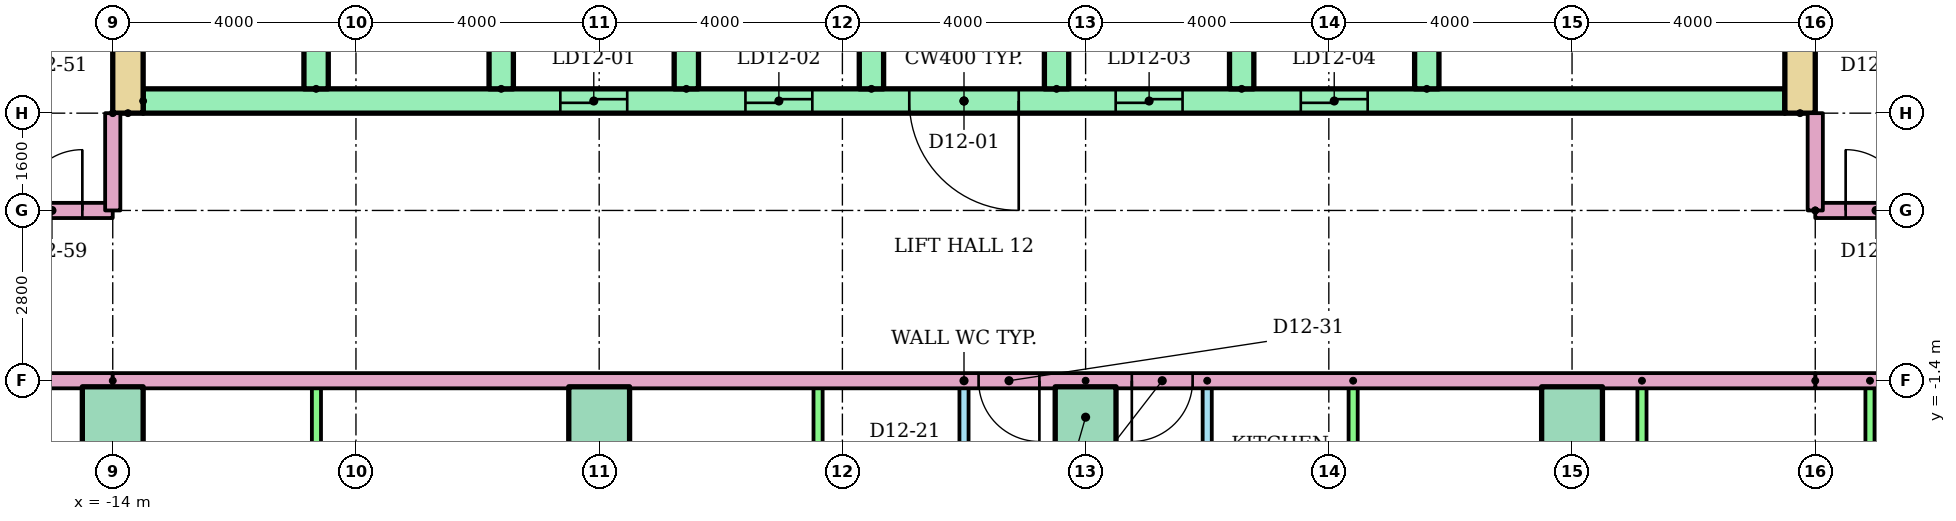
"""IFC4 building model, lengths in metres.
Left out: names, types, materials, properties, quantities, classifications, styles, units other than length and angle.
Written with IfcOpenShell. Run it as: python <this file> out.ifc"""

import sys

from ifc_helpers import new_model, si_unit, direction, frame, frame_2d, origin, origin_2d, place, context, subcontext, project, spatial, rectangle, extrude, element, fill, save


model = new_model("IFC4")
c1 = context("Model", 3, precision=1e-05, world=origin(), true_north=direction((0.0, 1.0)))
c2 = subcontext(c1, "Body", "Model", "MODEL_VIEW")
j1 = project(units=[si_unit("LENGTHUNIT", "METRE"), si_unit("PLANEANGLEUNIT", "RADIAN")], contexts=[c1])
p1 = place(None, origin())
s1 = spatial("IfcSite", under=j1, at=p1, CompositionType="ELEMENT")
p2 = place(p1, origin())
s2 = spatial("IfcBuilding", under=s1, at=p2, CompositionType="ELEMENT")
p3 = place(p2, frame((0.0, 0.0, 48.0)))
s3 = spatial("IfcBuildingStorey", under=s2, at=p3, CompositionType="ELEMENT", Elevation=48.0)
for number, where in (
    (1, (-14.0, -2.0, 0.0)),
    (2, (-6.0, -2.0, 0.0)),
    (3, (2.0, -2.0, 0.0)),
    (4, (10.0, -2.0, 0.0)),
):
    element("IfcColumn", number, at=place(p3, frame(where)), inside=s3, PredefinedType="COLUMN", context=c2, shape_type="SweptSolid", body=[
        extrude(rectangle(XDim=1.0, YDim=1.0, at=origin_2d()), origin(), (0.0, 0.0, 1.0), 3.2),
    ])
for number, where, z_axis, x_axis in (
    (5, (-13.75, 3.0, 0.0), (0.0, 0.0, 1.0), (0.0, 1.0, 0.0)),
    (6, (13.75, 3.0, 0.0), (0.0, 0.0, 1.0), (0.0, 1.0, 0.0)),
):
    element("IfcWall", number, at=place(p3, frame(where, z_axis=z_axis, x_axis=x_axis)), inside=s3, PredefinedType="SHEAR", context=c2, shape_type="SweptSolid", body=[
        extrude(rectangle(XDim=17.0, YDim=0.5, at=frame_2d((8.5, 0.0))), origin(), (0.0, 0.0, 1.0), 2.92),
    ])
p4 = place(p3, frame((-13.5, 3.2, 0.0)))
e7 = element("IfcWall", 7, at=p4, inside=s3, PredefinedType="SHEAR", context=c2, shape_type="SweptSolid", body=[
    extrude(rectangle(XDim=27.0, YDim=0.4, at=frame_2d((13.5, 0.0))), origin(), (0.0, 0.0, 1.0), 2.92),
])
p5 = place(p4, frame((6.861, 0.0, 0.0)))
e8 = element("IfcOpeningElement", 8, at=p5, cuts=e7, PredefinedType="OPENING", context=c2, shape_type="SweptSolid", body=[
    extrude(rectangle(XDim=1.1, YDim=2.1, at=frame_2d((0.55, 1.05))), frame((0.0, 0.21, 0.0), z_axis=(0.0, -1.0, 0.0), x_axis=(1.0, 0.0, 0.0)), (0.0, 0.0, 1.0), 0.42),
])
p6 = place(p4, frame((9.906, 0.0, 0.0)))
e9 = element("IfcOpeningElement", 9, at=p6, cuts=e7, PredefinedType="OPENING", context=c2, shape_type="SweptSolid", body=[
    extrude(rectangle(XDim=1.1, YDim=2.1, at=frame_2d((0.55, 1.05))), frame((0.0, 0.21, 0.0), z_axis=(0.0, -1.0, 0.0), x_axis=(1.0, 0.0, 0.0)), (0.0, 0.0, 1.0), 0.42),
])
p7 = place(p4, frame((15.994, 0.0, 0.0)))
e10 = element("IfcOpeningElement", 10, at=p7, cuts=e7, PredefinedType="OPENING", context=c2, shape_type="SweptSolid", body=[
    extrude(rectangle(XDim=1.1, YDim=2.1, at=frame_2d((0.55, 1.05))), frame((0.0, 0.21, 0.0), z_axis=(0.0, -1.0, 0.0), x_axis=(1.0, 0.0, 0.0)), (0.0, 0.0, 1.0), 0.42),
])
p8 = place(p4, frame((19.039, 0.0, 0.0)))
e11 = element("IfcOpeningElement", 11, at=p8, cuts=e7, PredefinedType="OPENING", context=c2, shape_type="SweptSolid", body=[
    extrude(rectangle(XDim=1.1, YDim=2.1, at=frame_2d((0.55, 1.05))), frame((0.0, 0.21, 0.0), z_axis=(0.0, -1.0, 0.0), x_axis=(1.0, 0.0, 0.0)), (0.0, 0.0, 1.0), 0.42),
])
p9 = place(p4, frame((12.6, 0.0, 0.0)))
e12 = element("IfcOpeningElement", 12, at=p9, cuts=e7, PredefinedType="OPENING", context=c2, shape_type="SweptSolid", body=[
    extrude(rectangle(XDim=1.8, YDim=2.1, at=frame_2d((0.9, 1.05))), frame((0.0, 0.21, 0.0), z_axis=(0.0, -1.0, 0.0), x_axis=(1.0, 0.0, 0.0)), (0.0, 0.0, 1.0), 0.42),
])
for number, where, z_axis, x_axis in (
    (13, (-10.656, 3.4, 0.0), (0.0, 0.0, 1.0), (0.0, 1.0, 0.0)),
    (14, (-7.611, 3.4, 0.0), (0.0, 0.0, 1.0), (0.0, 1.0, 0.0)),
    (15, (-4.567, 3.4, 0.0), (0.0, 0.0, 1.0), (0.0, 1.0, 0.0)),
    (16, (-1.522, 3.4, 0.0), (0.0, 0.0, 1.0), (0.0, 1.0, 0.0)),
    (17, (1.522, 3.4, 0.0), (0.0, 0.0, 1.0), (0.0, 1.0, 0.0)),
    (18, (4.567, 3.4, 0.0), (0.0, 0.0, 1.0), (0.0, 1.0, 0.0)),
    (19, (7.611, 3.4, 0.0), (0.0, 0.0, 1.0), (0.0, 1.0, 0.0)),
):
    element("IfcWall", number, at=place(p3, frame(where, z_axis=z_axis, x_axis=x_axis)), inside=s3, PredefinedType="SHEAR", context=c2, shape_type="SweptSolid", body=[
        extrude(rectangle(XDim=3.0, YDim=0.4, at=frame_2d((1.5, 0.0))), origin(), (0.0, 0.0, 1.0), 2.92),
    ])
p10 = place(p3, frame((0.0, -7.8, 0.0), z_axis=(0.0, 0.0, 1.0), x_axis=(0.0, 1.0, 0.0)))
e20 = element("IfcWall", 20, at=p10, inside=s3, PredefinedType="PARTITIONING", context=c2, shape_type="SweptSolid", body=[
    extrude(rectangle(XDim=6.4, YDim=0.15, at=frame_2d((3.2, 0.0))), origin(), (0.0, 0.0, 1.0), 2.4),
])
p11 = place(p10, frame((4.14, 0.0, 0.0)))
e21 = element("IfcOpeningElement", 21, at=p11, cuts=e20, PredefinedType="OPENING", context=c2, shape_type="SweptSolid", body=[
    extrude(rectangle(XDim=0.9, YDim=2.1, at=frame_2d((0.45, 1.05))), frame((0.0, 0.085, 0.0), z_axis=(0.0, -1.0, 0.0), x_axis=(1.0, 0.0, 0.0)), (0.0, 0.0, 1.0), 0.17),
])
p12 = place(p10, frame((1.05, 0.0, 0.0)))
e22 = element("IfcOpeningElement", 22, at=p12, cuts=e20, PredefinedType="OPENING", context=c2, shape_type="SweptSolid", body=[
    extrude(rectangle(XDim=0.8, YDim=2.1, at=frame_2d((0.4, 1.05))), frame((0.0, 0.085, 0.0), z_axis=(0.0, -1.0, 0.0), x_axis=(1.0, 0.0, 0.0)), (0.0, 0.0, 1.0), 0.17),
])
for number, where, z_axis, x_axis in (
    (23, (-2.4, -7.8, 0.0), (0.0, 0.0, 1.0), (0.0, 1.0, 0.0)),
    (24, (-10.65, -7.8, 0.0), (0.0, 0.0, 1.0), (0.0, 1.0, 0.0)),
):
    element("IfcWall", number, at=place(p3, frame(where, z_axis=z_axis, x_axis=x_axis)), inside=s3, PredefinedType="PARTITIONING", context=c2, shape_type="SweptSolid", body=[
        extrude(rectangle(XDim=6.4, YDim=0.15, at=frame_2d((3.2, 0.0))), origin(), (0.0, 0.0, 1.0), 2.4),
    ])
p13 = place(p3, frame((4.0, -1.4, 0.0), z_axis=(0.0, 0.0, 1.0), x_axis=(0.0, -1.0, 0.0)))
e25 = element("IfcWall", 25, at=p13, inside=s3, PredefinedType="PARTITIONING", context=c2, shape_type="SweptSolid", body=[
    extrude(rectangle(XDim=6.4, YDim=0.15, at=frame_2d((3.2, 0.0))), origin(), (0.0, 0.0, 1.0), 2.4),
])
p14 = place(p13, frame((1.36, 0.0, 0.0)))
e26 = element("IfcOpeningElement", 26, at=p14, cuts=e25, PredefinedType="OPENING", context=c2, shape_type="SweptSolid", body=[
    extrude(rectangle(XDim=0.9, YDim=2.1, at=frame_2d((0.45, 1.05))), frame((0.0, 0.085, 0.0), z_axis=(0.0, -1.0, 0.0), x_axis=(1.0, 0.0, 0.0)), (0.0, 0.0, 1.0), 0.17),
])
p15 = place(p13, frame((4.55, 0.0, 0.0)))
e27 = element("IfcOpeningElement", 27, at=p15, cuts=e25, PredefinedType="OPENING", context=c2, shape_type="SweptSolid", body=[
    extrude(rectangle(XDim=0.8, YDim=2.1, at=frame_2d((0.4, 1.05))), frame((0.0, 0.085, 0.0), z_axis=(0.0, -1.0, 0.0), x_axis=(1.0, 0.0, 0.0)), (0.0, 0.0, 1.0), 0.17),
])
for number, where, z_axis, x_axis in (
    (28, (6.4, -1.4, 0.0), (0.0, 0.0, 1.0), (0.0, -1.0, 0.0)),
    (29, (11.15, -1.4, 0.0), (0.0, 0.0, 1.0), (0.0, -1.0, 0.0)),
    (30, (14.9, -1.4, 0.0), (0.0, 0.0, 1.0), (0.0, -1.0, 0.0)),
):
    element("IfcWall", number, at=place(p3, frame(where, z_axis=z_axis, x_axis=x_axis)), inside=s3, PredefinedType="PARTITIONING", context=c2, shape_type="SweptSolid", body=[
        extrude(rectangle(XDim=6.4, YDim=0.15, at=frame_2d((3.2, 0.0))), origin(), (0.0, 0.0, 1.0), 2.4),
    ])
p16 = place(p3, frame((2.0, -1.4, 0.0), z_axis=(0.0, 0.0, 1.0), x_axis=(0.0, -1.0, 0.0)))
e31 = element("IfcWall", 31, at=p16, inside=s3, PredefinedType="PARTITIONING", context=c2, shape_type="SweptSolid", body=[
    extrude(rectangle(XDim=14.71, YDim=0.25, at=frame_2d((7.355, 0.0))), origin(), (0.0, 0.0, 1.0), 2.4),
])
p17 = place(p3, frame((-14.0, -1.4, 0.0), z_axis=(0.0, 0.0, 1.0), x_axis=(-1.0, 0.0, 0.0)))
e32 = element("IfcWall", 32, at=p17, inside=s3, PredefinedType="PARTITIONING", context=c2, shape_type="SweptSolid", body=[
    extrude(rectangle(XDim=15.0, YDim=0.25, at=frame_2d((7.5, 0.0))), origin(), (0.0, 0.0, 1.0), 2.4),
])
p18 = place(p17, frame((8.76, 0.0, 0.0)))
e33 = element("IfcOpeningElement", 33, at=p18, cuts=e32, PredefinedType="OPENING", context=c2, shape_type="SweptSolid", body=[
    extrude(rectangle(XDim=1.0, YDim=2.1, at=frame_2d((0.5, 1.05))), frame((0.0, 0.135, 0.0), z_axis=(0.0, -1.0, 0.0), x_axis=(1.0, 0.0, 0.0)), (0.0, 0.0, 1.0), 0.27),
])
p19 = place(p3, frame((29.0, -1.4, 0.0), z_axis=(0.0, 0.0, 1.0), x_axis=(-1.0, 0.0, 0.0)))
e34 = element("IfcWall", 34, at=p19, inside=s3, PredefinedType="PARTITIONING", context=c2, shape_type="SweptSolid", body=[
    extrude(rectangle(XDim=15.0, YDim=0.25, at=frame_2d((7.5, 0.0))), origin(), (0.0, 0.0, 1.0), 2.4),
])
p20 = place(p19, frame((9.24, 0.0, 0.0)))
e35 = element("IfcOpeningElement", 35, at=p20, cuts=e34, PredefinedType="OPENING", context=c2, shape_type="SweptSolid", body=[
    extrude(rectangle(XDim=1.0, YDim=2.1, at=frame_2d((0.5, 1.05))), frame((0.0, 0.135, 0.0), z_axis=(0.0, -1.0, 0.0), x_axis=(1.0, 0.0, 0.0)), (0.0, 0.0, 1.0), 0.27),
])
p21 = place(p3, frame((-29.0, 1.4, 0.0)))
e36 = element("IfcWall", 36, at=p21, inside=s3, PredefinedType="PARTITIONING", context=c2, shape_type="SweptSolid", body=[
    extrude(rectangle(XDim=15.0, YDim=0.25, at=frame_2d((7.5, 0.0))), origin(), (0.0, 0.0, 1.0), 2.4),
])
p22 = place(p21, frame((13.5, 0.0, 0.0)))
e37 = element("IfcOpeningElement", 37, at=p22, cuts=e36, PredefinedType="OPENING", context=c2, shape_type="SweptSolid", body=[
    extrude(rectangle(XDim=1.0, YDim=2.1, at=frame_2d((0.5, 1.05))), frame((0.0, 0.135, 0.0), z_axis=(0.0, -1.0, 0.0), x_axis=(1.0, 0.0, 0.0)), (0.0, 0.0, 1.0), 0.27),
])
p23 = place(p3, frame((14.0, 1.4, 0.0)))
e38 = element("IfcWall", 38, at=p23, inside=s3, PredefinedType="PARTITIONING", context=c2, shape_type="SweptSolid", body=[
    extrude(rectangle(XDim=15.0, YDim=0.25, at=frame_2d((7.5, 0.0))), origin(), (0.0, 0.0, 1.0), 2.4),
])
p24 = place(p23, frame((0.5, 0.0, 0.0)))
e39 = element("IfcOpeningElement", 39, at=p24, cuts=e38, PredefinedType="OPENING", context=c2, shape_type="SweptSolid", body=[
    extrude(rectangle(XDim=1.0, YDim=2.1, at=frame_2d((0.5, 1.05))), frame((0.0, 0.135, 0.0), z_axis=(0.0, -1.0, 0.0), x_axis=(1.0, 0.0, 0.0)), (0.0, 0.0, 1.0), 0.27),
])
p25 = place(p23, frame((12.76, 0.0, 0.0)))
e40 = element("IfcOpeningElement", 40, at=p25, cuts=e38, PredefinedType="OPENING", context=c2, shape_type="SweptSolid", body=[
    extrude(rectangle(XDim=1.0, YDim=2.1, at=frame_2d((0.5, 1.05))), frame((0.0, 0.135, 0.0), z_axis=(0.0, -1.0, 0.0), x_axis=(1.0, 0.0, 0.0)), (0.0, 0.0, 1.0), 0.27),
])
p26 = place(p3, frame((14.0, -1.4, 0.0), z_axis=(0.0, 0.0, 1.0), x_axis=(-1.0, 0.0, 0.0)))
e41 = element("IfcWall", 41, at=p26, inside=s3, PredefinedType="PARTITIONING", context=c2, shape_type="SweptSolid", body=[
    extrude(rectangle(XDim=28.0, YDim=0.25, at=frame_2d((14.0, 0.0))), origin(), (0.0, 0.0, 1.0), 2.4),
])
p27 = place(p26, frame((12.76, 0.0, 0.0)))
e42 = element("IfcOpeningElement", 42, at=p27, cuts=e41, PredefinedType="OPENING", context=c2, shape_type="SweptSolid", body=[
    extrude(rectangle(XDim=1.0, YDim=2.1, at=frame_2d((0.5, 1.05))), frame((0.0, 0.135, 0.0), z_axis=(0.0, -1.0, 0.0), x_axis=(1.0, 0.0, 0.0)), (0.0, 0.0, 1.0), 0.27),
])
p28 = place(p26, frame((10.24, 0.0, 0.0)))
e43 = element("IfcOpeningElement", 43, at=p28, cuts=e41, PredefinedType="OPENING", context=c2, shape_type="SweptSolid", body=[
    extrude(rectangle(XDim=1.0, YDim=2.1, at=frame_2d((0.5, 1.05))), frame((0.0, 0.135, 0.0), z_axis=(0.0, -1.0, 0.0), x_axis=(1.0, 0.0, 0.0)), (0.0, 0.0, 1.0), 0.27),
])
for number, where, z_axis, x_axis in (
    (44, (-14.0, 3.0, 0.0), (0.0, 0.0, 1.0), (0.0, -1.0, 0.0)),
    (45, (14.0, 1.4, 0.0), (0.0, 0.0, 1.0), (0.0, 1.0, 0.0)),
):
    element("IfcWall", number, at=place(p3, frame(where, z_axis=z_axis, x_axis=x_axis)), inside=s3, PredefinedType="PARTITIONING", context=c2, shape_type="SweptSolid", body=[
        extrude(rectangle(XDim=1.6, YDim=0.25, at=frame_2d((0.8, 0.0))), origin(), (0.0, 0.0, 1.0), 2.4),
    ])
p29 = place(p5, origin())
e46 = element("IfcDoor", 46, at=p29, inside=s3, OperationType="SLIDING_TO_LEFT", PredefinedType="DOOR", context=c2, shape_type="SweptSolid", body=[
    extrude(rectangle(XDim=1.1, YDim=2.1, at=frame_2d((0.55, 1.05))), frame((0.0, 0.025, 0.0), z_axis=(0.0, -1.0, 0.0), x_axis=(1.0, 0.0, 0.0)), (0.0, 0.0, 1.0), 0.05),
])
fill(e8, e46)
p30 = place(p6, origin())
e47 = element("IfcDoor", 47, at=p30, inside=s3, OperationType="SLIDING_TO_LEFT", PredefinedType="DOOR", context=c2, shape_type="SweptSolid", body=[
    extrude(rectangle(XDim=1.1, YDim=2.1, at=frame_2d((0.55, 1.05))), frame((0.0, 0.025, 0.0), z_axis=(0.0, -1.0, 0.0), x_axis=(1.0, 0.0, 0.0)), (0.0, 0.0, 1.0), 0.05),
])
fill(e9, e47)
p31 = place(p7, origin())
e48 = element("IfcDoor", 48, at=p31, inside=s3, OperationType="SLIDING_TO_LEFT", PredefinedType="DOOR", context=c2, shape_type="SweptSolid", body=[
    extrude(rectangle(XDim=1.1, YDim=2.1, at=frame_2d((0.55, 1.05))), frame((0.0, 0.025, 0.0), z_axis=(0.0, -1.0, 0.0), x_axis=(1.0, 0.0, 0.0)), (0.0, 0.0, 1.0), 0.05),
])
fill(e10, e48)
p32 = place(p8, origin())
e49 = element("IfcDoor", 49, at=p32, inside=s3, OperationType="SLIDING_TO_LEFT", PredefinedType="DOOR", context=c2, shape_type="SweptSolid", body=[
    extrude(rectangle(XDim=1.1, YDim=2.1, at=frame_2d((0.55, 1.05))), frame((0.0, 0.025, 0.0), z_axis=(0.0, -1.0, 0.0), x_axis=(1.0, 0.0, 0.0)), (0.0, 0.0, 1.0), 0.05),
])
fill(e11, e49)
p33 = place(p9, frame((1.8, 0.0, 0.0), z_axis=(0.0, 0.0, 1.0), x_axis=(-1.0, 0.0, 0.0)))
e50 = element("IfcDoor", 50, at=p33, inside=s3, OperationType="DOUBLE_DOOR_SINGLE_SWING", PredefinedType="DOOR", context=c2, shape_type="SweptSolid", body=[
    extrude(rectangle(XDim=1.8, YDim=2.1, at=frame_2d((0.9, 1.05))), frame((0.0, 0.025, 0.0), z_axis=(0.0, -1.0, 0.0), x_axis=(1.0, 0.0, 0.0)), (0.0, 0.0, 1.0), 0.05),
])
fill(e12, e50)
p34 = place(p27, origin())
e51 = element("IfcDoor", 51, at=p34, inside=s3, OperationType="SINGLE_SWING_LEFT", PredefinedType="DOOR", context=c2, shape_type="SweptSolid", body=[
    extrude(rectangle(XDim=1.0, YDim=2.1, at=frame_2d((0.5, 1.05))), frame((0.0, 0.025, 0.0), z_axis=(0.0, -1.0, 0.0), x_axis=(1.0, 0.0, 0.0)), (0.0, 0.0, 1.0), 0.05),
])
fill(e42, e51)
p35 = place(p28, origin())
e52 = element("IfcDoor", 52, at=p35, inside=s3, OperationType="SINGLE_SWING_RIGHT", PredefinedType="DOOR", context=c2, shape_type="SweptSolid", body=[
    extrude(rectangle(XDim=1.0, YDim=2.1, at=frame_2d((0.5, 1.05))), frame((0.0, 0.025, 0.0), z_axis=(0.0, -1.0, 0.0), x_axis=(1.0, 0.0, 0.0)), (0.0, 0.0, 1.0), 0.05),
])
fill(e43, e52)
p36 = place(p22, origin())
e53 = element("IfcDoor", 53, at=p36, inside=s3, OperationType="SINGLE_SWING_RIGHT", PredefinedType="DOOR", context=c2, shape_type="SweptSolid", body=[
    extrude(rectangle(XDim=1.0, YDim=2.1, at=frame_2d((0.5, 1.05))), frame((0.0, 0.025, 0.0), z_axis=(0.0, -1.0, 0.0), x_axis=(1.0, 0.0, 0.0)), (0.0, 0.0, 1.0), 0.05),
])
fill(e37, e53)
p37 = place(p24, origin())
e54 = element("IfcDoor", 54, at=p37, inside=s3, OperationType="SINGLE_SWING_LEFT", PredefinedType="DOOR", context=c2, shape_type="SweptSolid", body=[
    extrude(rectangle(XDim=1.0, YDim=2.1, at=frame_2d((0.5, 1.05))), frame((0.0, 0.025, 0.0), z_axis=(0.0, -1.0, 0.0), x_axis=(1.0, 0.0, 0.0)), (0.0, 0.0, 1.0), 0.05),
])
fill(e39, e54)
save(model, sys.argv[1])
